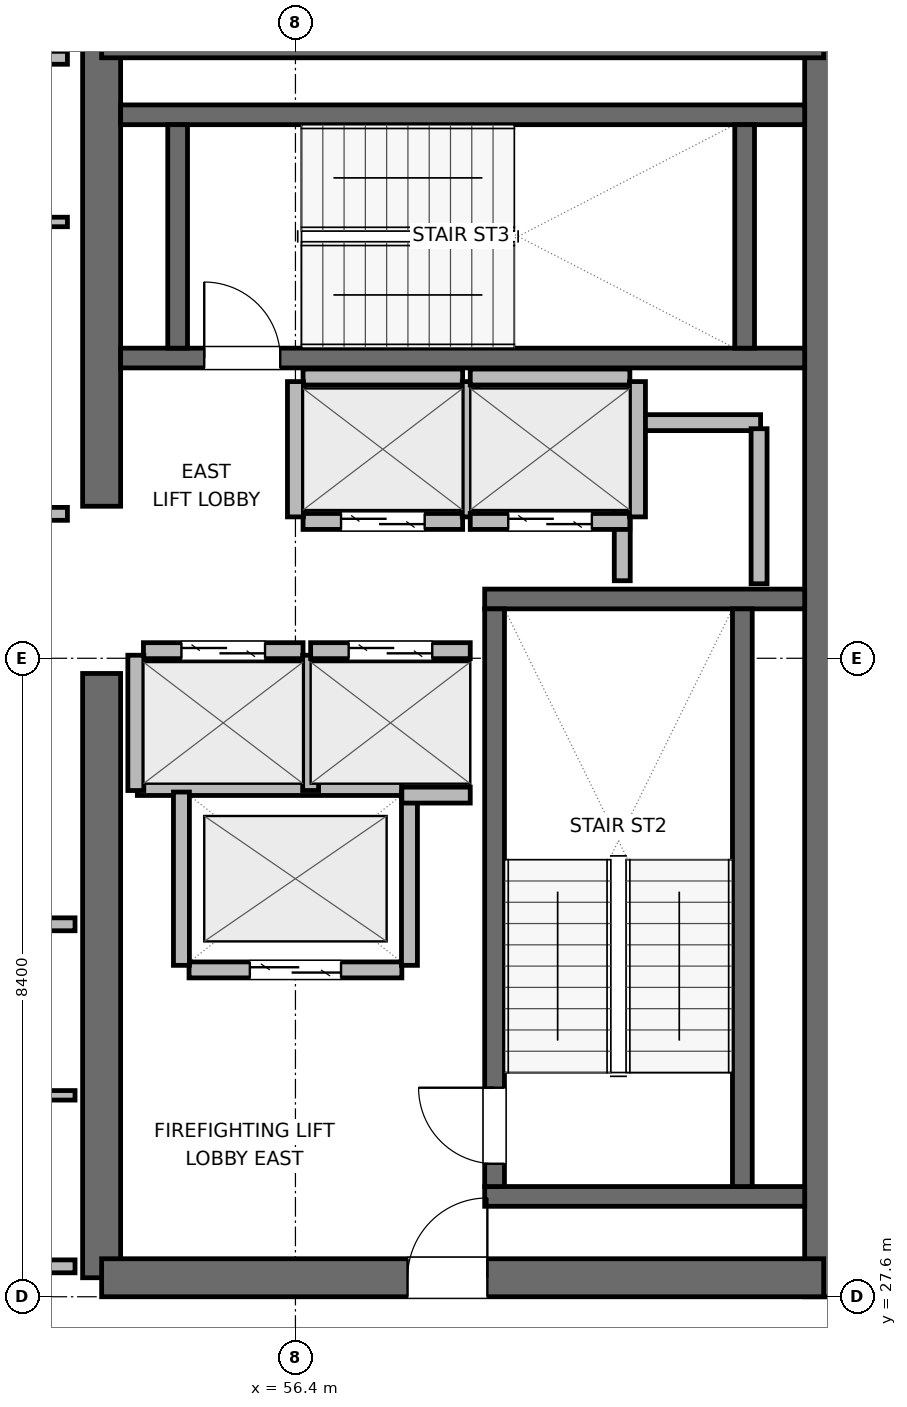
"""IFC4 building model, lengths in metres.
Left out: names, types, materials, properties, quantities, classifications, styles, units other than length and angle.
Written with IfcOpenShell. Run it as: python <this file> out.ifc"""

import sys

from ifc_helpers import new_model, si_unit, direction, frame, frame_2d, origin, place, context, subcontext, project, spatial, rectangle, extrude, element, fill, save


model = new_model("IFC4")
c1 = context("Model", 3, precision=1e-05, world=origin(), true_north=direction((0.0, 1.0)))
c2 = subcontext(c1, "Body", "Model", "MODEL_VIEW")
j1 = project(units=[si_unit("LENGTHUNIT", "METRE"), si_unit("PLANEANGLEUNIT", "RADIAN")], contexts=[c1])
p1 = place(None, origin())
s1 = spatial("IfcSite", under=j1, at=p1, CompositionType="ELEMENT")
p2 = place(p1, origin())
s2 = spatial("IfcBuilding", under=s1, at=p2, CompositionType="ELEMENT")
p3 = place(p2, frame((0.0, 0.0, 346.5)))
s3 = spatial("IfcBuildingStorey", under=s2, at=p3, CompositionType="ELEMENT", Elevation=346.5)
p4 = place(p3, frame((53.85, 27.85, 0.0), z_axis=(0.0, 0.0, 1.0), x_axis=(0.0, 1.0, 0.0)))
e1 = element("IfcWall", 1, at=p4, inside=s3, PredefinedType="SHEAR", context=c2, shape_type="SweptSolid", body=[
    extrude(rectangle(XDim=7.95, YDim=0.5, at=frame_2d((3.975, 0.0))), origin(), (0.0, 0.0, 1.0), 3.9),
])
p5 = place(p3, frame((53.85, 38.0, 0.0), z_axis=(0.0, 0.0, 1.0), x_axis=(0.0, 1.0, 0.0)))
e2 = element("IfcWall", 2, at=p5, inside=s3, PredefinedType="SHEAR", context=c2, shape_type="SweptSolid", body=[
    extrude(rectangle(XDim=6.15, YDim=0.5, at=frame_2d((3.075, 0.0))), origin(), (0.0, 0.0, 1.0), 3.9),
])
p6 = place(p3, frame((63.35, 27.6, 0.0), z_axis=(0.0, 0.0, 1.0), x_axis=(0.0, 1.0, 0.0)))
e3 = element("IfcWall", 3, at=p6, inside=s3, PredefinedType="SHEAR", context=c2, shape_type="SweptSolid", body=[
    extrude(rectangle(XDim=16.8, YDim=0.5, at=frame_2d((8.4, 0.0))), origin(), (0.0, 0.0, 1.0), 3.9),
])
p7 = place(p3, frame((53.85, 27.85, 0.0), z_axis=(0.0, 0.0, 1.0), x_axis=(1.0, 0.0, 0.0)))
e4 = element("IfcWall", 4, at=p7, inside=s3, PredefinedType="SHEAR", context=c2, shape_type="SweptSolid", body=[
    extrude(rectangle(XDim=9.5, YDim=0.5, at=frame_2d((4.75, 0.0))), origin(), (0.0, 0.0, 1.0), 3.9),
])
p8 = place(p7, frame((4.025, 0.0, 0.0)))
e5 = element("IfcOpeningElement", 5, at=p8, cuts=e4, PredefinedType="OPENING", context=c2, shape_type="SweptSolid", body=[
    extrude(rectangle(XDim=1.05, YDim=2.04, at=frame_2d((0.525, 1.02))), frame((0.0, 0.26, 0.0), z_axis=(0.0, -1.0, 0.0), x_axis=(1.0, 0.0, 0.0)), (0.0, 0.0, 1.0), 0.52),
])
p9 = place(p3, frame((53.85, 44.15, 0.0), z_axis=(0.0, 0.0, 1.0), x_axis=(1.0, 0.0, 0.0)))
e6 = element("IfcWall", 6, at=p9, inside=s3, PredefinedType="SHEAR", context=c2, shape_type="SweptSolid", body=[
    extrude(rectangle(XDim=9.5, YDim=0.5, at=frame_2d((4.75, 0.0))), origin(), (0.0, 0.0, 1.0), 3.9),
])
for number, where, z_axis, x_axis in (
    (7, (58.89, 28.92, 0.0), (0.0, 0.0, 1.0), (1.0, 0.0, 0.0)),
    (8, (58.89, 36.78, 0.0), (0.0, 0.0, 1.0), (1.0, 0.0, 0.0)),
):
    element("IfcWall", number, at=place(p3, frame(where, z_axis=z_axis, x_axis=x_axis)), inside=s3, PredefinedType="SHEAR", context=c2, shape_type="SweptSolid", body=[
        extrude(rectangle(XDim=4.21, YDim=0.26, at=frame_2d((2.105, 0.0))), origin(), (0.0, 0.0, 1.0), 3.9),
    ])
p10 = place(p3, frame((59.02, 29.05, 0.0), z_axis=(0.0, 0.0, 1.0), x_axis=(0.0, 1.0, 0.0)))
e9 = element("IfcWall", 9, at=p10, inside=s3, PredefinedType="SHEAR", context=c2, shape_type="SweptSolid", body=[
    extrude(rectangle(XDim=7.6, YDim=0.26, at=frame_2d((3.8, 0.0))), origin(), (0.0, 0.0, 1.0), 3.9),
])
p11 = place(p10, frame((0.3, 0.0, 0.0)))
e10 = element("IfcOpeningElement", 10, at=p11, cuts=e9, PredefinedType="OPENING", context=c2, shape_type="SweptSolid", body=[
    extrude(rectangle(XDim=1.0, YDim=2.04, at=frame_2d((0.5, 1.02))), frame((0.0, 0.14, 0.0), z_axis=(0.0, -1.0, 0.0), x_axis=(1.0, 0.0, 0.0)), (0.0, 0.0, 1.0), 0.28),
])
p12 = place(p3, frame((62.28, 29.05, 0.0), z_axis=(0.0, 0.0, 1.0), x_axis=(0.0, 1.0, 0.0)))
e11 = element("IfcWall", 11, at=p12, inside=s3, PredefinedType="SHEAR", context=c2, shape_type="SweptSolid", body=[
    extrude(rectangle(XDim=7.6, YDim=0.26, at=frame_2d((3.8, 0.0))), origin(), (0.0, 0.0, 1.0), 3.9),
])
p13 = place(p3, frame((54.1, 39.95, 0.0), z_axis=(0.0, 0.0, 1.0), x_axis=(1.0, 0.0, 0.0)))
e12 = element("IfcWall", 12, at=p13, inside=s3, PredefinedType="SHEAR", context=c2, shape_type="SweptSolid", body=[
    extrude(rectangle(XDim=9.0, YDim=0.26, at=frame_2d((4.5, 0.0))), origin(), (0.0, 0.0, 1.0), 3.9),
])
p14 = place(p13, frame((1.1, 0.0, 0.0)))
e13 = element("IfcOpeningElement", 13, at=p14, cuts=e12, PredefinedType="OPENING", context=c2, shape_type="SweptSolid", body=[
    extrude(rectangle(XDim=1.0, YDim=2.04, at=frame_2d((0.5, 1.02))), frame((0.0, 0.14, 0.0), z_axis=(0.0, -1.0, 0.0), x_axis=(1.0, 0.0, 0.0)), (0.0, 0.0, 1.0), 0.28),
])
p15 = place(p3, frame((54.1, 43.15, 0.0), z_axis=(0.0, 0.0, 1.0), x_axis=(1.0, 0.0, 0.0)))
e14 = element("IfcWall", 14, at=p15, inside=s3, PredefinedType="SHEAR", context=c2, shape_type="SweptSolid", body=[
    extrude(rectangle(XDim=9.0, YDim=0.26, at=frame_2d((4.5, 0.0))), origin(), (0.0, 0.0, 1.0), 3.9),
])
for number, where, z_axis, x_axis in (
    (15, (54.85, 40.08, 0.0), (0.0, 0.0, 1.0), (0.0, 1.0, 0.0)),
    (16, (62.31, 40.08, 0.0), (0.0, 0.0, 1.0), (0.0, 1.0, 0.0)),
):
    element("IfcWall", number, at=place(p3, frame(where, z_axis=z_axis, x_axis=x_axis)), inside=s3, PredefinedType="SHEAR", context=c2, shape_type="SweptSolid", body=[
        extrude(rectangle(XDim=2.94, YDim=0.26, at=frame_2d((1.47, 0.0))), origin(), (0.0, 0.0, 1.0), 3.9),
    ])
p16 = place(p3, frame((60.72, 39.1, 0.0), z_axis=(0.0, 0.0, 1.0), x_axis=(1.0, 0.0, 0.0)))
e17 = element("IfcWall", 17, at=p16, inside=s3, PredefinedType="PARTITIONING", context=c2, shape_type="SweptSolid", body=[
    extrude(rectangle(XDim=1.8, YDim=0.21, at=frame_2d((0.9, 0.0))), origin(), (0.0, 0.0, 1.0), 3.68),
])
p17 = place(p3, frame((60.7, 37.02, 0.0), z_axis=(0.0, 0.0, 1.0), x_axis=(0.0, 1.0, 0.0)))
e18 = element("IfcWall", 18, at=p17, inside=s3, PredefinedType="PARTITIONING", context=c2, shape_type="SweptSolid", body=[
    extrude(rectangle(XDim=1.96, YDim=0.21, at=frame_2d((0.98, 0.0))), origin(), (0.0, 0.0, 1.0), 3.68),
])
p18 = place(p3, frame((62.5, 36.98, 0.0), z_axis=(0.0, 0.0, 1.0), x_axis=(0.0, 1.0, 0.0)))
e19 = element("IfcWall", 19, at=p18, inside=s3, PredefinedType="PARTITIONING", context=c2, shape_type="SweptSolid", body=[
    extrude(rectangle(XDim=2.04, YDim=0.21, at=frame_2d((1.02, 0.0))), origin(), (0.0, 0.0, 1.0), 3.68),
])
p19 = place(p3, frame((55.0, 31.9, 0.0), z_axis=(0.0, 0.0, 1.0), x_axis=(1.0, 0.0, 0.0)))
e20 = element("IfcWall", 20, at=p19, inside=s3, PredefinedType="PARTITIONING", context=c2, shape_type="SweptSolid", body=[
    extrude(rectangle(XDim=2.8, YDim=0.21, at=frame_2d((1.4, 0.0))), origin(), (0.0, 0.0, 1.0), 3.68),
])
p20 = place(p19, frame((0.8, 0.0, 0.0)))
e21 = element("IfcOpeningElement", 21, at=p20, cuts=e20, PredefinedType="OPENING", context=c2, shape_type="SweptSolid", body=[
    extrude(rectangle(XDim=1.2, YDim=2.04, at=frame_2d((0.6, 1.02))), frame((0.0, 0.115, 0.0), z_axis=(0.0, -1.0, 0.0), x_axis=(1.0, 0.0, 0.0)), (0.0, 0.0, 1.0), 0.23),
])
p21 = place(p3, frame((54.32, 34.3, 0.0), z_axis=(0.0, 0.0, 1.0), x_axis=(1.0, 0.0, 0.0)))
e22 = element("IfcWall", 22, at=p21, inside=s3, PredefinedType="PARTITIONING", context=c2, shape_type="SweptSolid", body=[
    extrude(rectangle(XDim=3.48, YDim=0.21, at=frame_2d((1.74, 0.0))), origin(), (0.0, 0.0, 1.0), 3.68),
])
for number, where, z_axis, x_axis in (
    (23, (54.9, 31.96, 0.0), (0.0, 0.0, 1.0), (0.0, 1.0, 0.0)),
    (24, (57.9, 31.96, 0.0), (0.0, 0.0, 1.0), (0.0, 1.0, 0.0)),
):
    element("IfcWall", number, at=place(p3, frame(where, z_axis=z_axis, x_axis=x_axis)), inside=s3, PredefinedType="PARTITIONING", context=c2, shape_type="SweptSolid", body=[
        extrude(rectangle(XDim=2.28, YDim=0.21, at=frame_2d((1.14, 0.0))), origin(), (0.0, 0.0, 1.0), 3.68),
    ])
p22 = place(p3, frame((54.4, 36.1, 0.0), z_axis=(0.0, 0.0, 1.0), x_axis=(1.0, 0.0, 0.0)))
e25 = element("IfcWall", 25, at=p22, inside=s3, PredefinedType="PARTITIONING", context=c2, shape_type="SweptSolid", body=[
    extrude(rectangle(XDim=2.1, YDim=0.21, at=frame_2d((1.05, 0.0))), origin(), (0.0, 0.0, 1.0), 3.68),
])
p23 = place(p22, frame((0.5, 0.0, 0.0)))
e26 = element("IfcOpeningElement", 26, at=p23, cuts=e25, PredefinedType="OPENING", context=c2, shape_type="SweptSolid", body=[
    extrude(rectangle(XDim=1.1, YDim=2.04, at=frame_2d((0.55, 1.02))), frame((0.0, 0.115, 0.0), z_axis=(0.0, -1.0, 0.0), x_axis=(1.0, 0.0, 0.0)), (0.0, 0.0, 1.0), 0.23),
])
for number, where, z_axis, x_axis in (
    (27, (54.3, 34.26, 0.0), (0.0, 0.0, 1.0), (0.0, 1.0, 0.0)),
    (28, (56.6, 34.26, 0.0), (0.0, 0.0, 1.0), (0.0, 1.0, 0.0)),
):
    element("IfcWall", number, at=place(p3, frame(where, z_axis=z_axis, x_axis=x_axis)), inside=s3, PredefinedType="PARTITIONING", context=c2, shape_type="SweptSolid", body=[
        extrude(rectangle(XDim=1.78, YDim=0.21, at=frame_2d((0.89, 0.0))), origin(), (0.0, 0.0, 1.0), 3.68),
    ])
p24 = place(p3, frame((56.6, 36.1, 0.0), z_axis=(0.0, 0.0, 1.0), x_axis=(1.0, 0.0, 0.0)))
e29 = element("IfcWall", 29, at=p24, inside=s3, PredefinedType="PARTITIONING", context=c2, shape_type="SweptSolid", body=[
    extrude(rectangle(XDim=2.1, YDim=0.21, at=frame_2d((1.05, 0.0))), origin(), (0.0, 0.0, 1.0), 3.68),
])
p25 = place(p24, frame((0.5, 0.0, 0.0)))
e30 = element("IfcOpeningElement", 30, at=p25, cuts=e29, PredefinedType="OPENING", context=c2, shape_type="SweptSolid", body=[
    extrude(rectangle(XDim=1.1, YDim=2.04, at=frame_2d((0.55, 1.02))), frame((0.0, 0.115, 0.0), z_axis=(0.0, -1.0, 0.0), x_axis=(1.0, 0.0, 0.0)), (0.0, 0.0, 1.0), 0.23),
])
p26 = place(p3, frame((57.8, 34.2, 0.0), z_axis=(0.0, 0.0, 1.0), x_axis=(1.0, 0.0, 0.0)))
e31 = element("IfcWall", 31, at=p26, inside=s3, PredefinedType="PARTITIONING", context=c2, shape_type="SweptSolid", body=[
    extrude(rectangle(XDim=0.9, YDim=0.21, at=frame_2d((0.45, 0.0))), origin(), (0.0, 0.0, 1.0), 3.68),
])
p27 = place(p3, frame((56.5, 37.8, 0.0), z_axis=(0.0, 0.0, 1.0), x_axis=(1.0, 0.0, 0.0)))
e32 = element("IfcWall", 32, at=p27, inside=s3, PredefinedType="PARTITIONING", context=c2, shape_type="SweptSolid", body=[
    extrude(rectangle(XDim=2.1, YDim=0.21, at=frame_2d((1.05, 0.0))), origin(), (0.0, 0.0, 1.0), 3.68),
])
p28 = place(p27, frame((0.5, 0.0, 0.0)))
e33 = element("IfcOpeningElement", 33, at=p28, cuts=e32, PredefinedType="OPENING", context=c2, shape_type="SweptSolid", body=[
    extrude(rectangle(XDim=1.1, YDim=2.04, at=frame_2d((0.55, 1.02))), frame((0.0, 0.115, 0.0), z_axis=(0.0, -1.0, 0.0), x_axis=(1.0, 0.0, 0.0)), (0.0, 0.0, 1.0), 0.23),
])
p29 = place(p3, frame((56.5, 39.7, 0.0), z_axis=(0.0, 0.0, 1.0), x_axis=(1.0, 0.0, 0.0)))
e34 = element("IfcWall", 34, at=p29, inside=s3, PredefinedType="PARTITIONING", context=c2, shape_type="SweptSolid", body=[
    extrude(rectangle(XDim=2.1, YDim=0.21, at=frame_2d((1.05, 0.0))), origin(), (0.0, 0.0, 1.0), 3.68),
])
for number, where, z_axis, x_axis in (
    (35, (56.4, 37.86, 0.0), (0.0, 0.0, 1.0), (0.0, 1.0, 0.0)),
    (36, (58.7, 37.86, 0.0), (0.0, 0.0, 1.0), (0.0, 1.0, 0.0)),
):
    element("IfcWall", number, at=place(p3, frame(where, z_axis=z_axis, x_axis=x_axis)), inside=s3, PredefinedType="PARTITIONING", context=c2, shape_type="SweptSolid", body=[
        extrude(rectangle(XDim=1.78, YDim=0.21, at=frame_2d((0.89, 0.0))), origin(), (0.0, 0.0, 1.0), 3.68),
    ])
p30 = place(p3, frame((58.7, 37.8, 0.0), z_axis=(0.0, 0.0, 1.0), x_axis=(1.0, 0.0, 0.0)))
e37 = element("IfcWall", 37, at=p30, inside=s3, PredefinedType="PARTITIONING", context=c2, shape_type="SweptSolid", body=[
    extrude(rectangle(XDim=2.1, YDim=0.21, at=frame_2d((1.05, 0.0))), origin(), (0.0, 0.0, 1.0), 3.68),
])
p31 = place(p30, frame((0.5, 0.0, 0.0)))
e38 = element("IfcOpeningElement", 38, at=p31, cuts=e37, PredefinedType="OPENING", context=c2, shape_type="SweptSolid", body=[
    extrude(rectangle(XDim=1.1, YDim=2.04, at=frame_2d((0.55, 1.02))), frame((0.0, 0.115, 0.0), z_axis=(0.0, -1.0, 0.0), x_axis=(1.0, 0.0, 0.0)), (0.0, 0.0, 1.0), 0.23),
])
p32 = place(p3, frame((58.7, 39.7, 0.0), z_axis=(0.0, 0.0, 1.0), x_axis=(1.0, 0.0, 0.0)))
e39 = element("IfcWall", 39, at=p32, inside=s3, PredefinedType="PARTITIONING", context=c2, shape_type="SweptSolid", body=[
    extrude(rectangle(XDim=2.1, YDim=0.21, at=frame_2d((1.05, 0.0))), origin(), (0.0, 0.0, 1.0), 3.68),
])
p33 = place(p3, frame((60.9, 37.86, 0.0), z_axis=(0.0, 0.0, 1.0), x_axis=(0.0, 1.0, 0.0)))
e40 = element("IfcWall", 40, at=p33, inside=s3, PredefinedType="PARTITIONING", context=c2, shape_type="SweptSolid", body=[
    extrude(rectangle(XDim=1.78, YDim=0.21, at=frame_2d((0.89, 0.0))), origin(), (0.0, 0.0, 1.0), 3.68),
])
p34 = place(p3, frame((49.287, 28.0, 0.0), z_axis=(0.0, 0.0, 1.0), x_axis=(1.0, 0.0, 0.0)))
e41 = element("IfcWall", 41, at=p34, inside=s3, PredefinedType="PARTITIONING", context=c2, shape_type="SweptSolid", body=[
    extrude(rectangle(XDim=4.213, YDim=0.17, at=frame_2d((2.106, 0.0))), origin(), (0.0, 0.0, 1.0), 2.765),
])
p35 = place(p3, frame((52.2, 32.5, 0.0), z_axis=(0.0, 0.0, 1.0), x_axis=(1.0, 0.0, 0.0)))
e42 = element("IfcWall", 42, at=p35, inside=s3, PredefinedType="PARTITIONING", context=c2, shape_type="SweptSolid", body=[
    extrude(rectangle(XDim=1.3, YDim=0.17, at=frame_2d((0.65, 0.0))), origin(), (0.0, 0.0, 1.0), 3.68),
])
p36 = place(p3, frame((49.287, 30.25, 0.0), z_axis=(0.0, 0.0, 1.0), x_axis=(1.0, 0.0, 0.0)))
e43 = element("IfcWall", 43, at=p36, inside=s3, PredefinedType="PARTITIONING", context=c2, shape_type="SweptSolid", body=[
    extrude(rectangle(XDim=4.213, YDim=0.125, at=frame_2d((2.106, 0.0))), origin(), (0.0, 0.0, 1.0), 3.68),
])
p37 = place(p3, frame((49.287, 37.9, 0.0), z_axis=(0.0, 0.0, 1.0), x_axis=(1.0, 0.0, 0.0)))
e44 = element("IfcWall", 44, at=p37, inside=s3, PredefinedType="PARTITIONING", context=c2, shape_type="SweptSolid", body=[
    extrude(rectangle(XDim=4.113, YDim=0.17, at=frame_2d((2.056, 0.0))), origin(), (0.0, 0.0, 1.0), 3.68),
])
p38 = place(p3, frame((49.287, 43.9, 0.0), z_axis=(0.0, 0.0, 1.0), x_axis=(1.0, 0.0, 0.0)))
e45 = element("IfcWall", 45, at=p38, inside=s3, PredefinedType="PARTITIONING", context=c2, shape_type="SweptSolid", body=[
    extrude(rectangle(XDim=4.113, YDim=0.17, at=frame_2d((2.056, 0.0))), origin(), (0.0, 0.0, 1.0), 2.765),
])
p39 = place(p3, frame((49.287, 41.74, 0.0), z_axis=(0.0, 0.0, 1.0), x_axis=(1.0, 0.0, 0.0)))
e46 = element("IfcWall", 46, at=p39, inside=s3, PredefinedType="PARTITIONING", context=c2, shape_type="SweptSolid", body=[
    extrude(rectangle(XDim=4.113, YDim=0.125, at=frame_2d((2.056, 0.0))), origin(), (0.0, 0.0, 1.0), 3.68),
])
p40 = place(p11, origin())
e47 = element("IfcDoor", 47, at=p40, inside=s3, OperationType="SINGLE_SWING_RIGHT", PredefinedType="DOOR", context=c2, shape_type="SweptSolid", body=[
    extrude(rectangle(XDim=1.0, YDim=2.04, at=frame_2d((0.5, 1.02))), frame((0.0, 0.025, 0.0), z_axis=(0.0, -1.0, 0.0), x_axis=(1.0, 0.0, 0.0)), (0.0, 0.0, 1.0), 0.05),
])
fill(e10, e47)
p41 = place(p14, origin())
e48 = element("IfcDoor", 48, at=p41, inside=s3, OperationType="SINGLE_SWING_LEFT", PredefinedType="DOOR", context=c2, shape_type="SweptSolid", body=[
    extrude(rectangle(XDim=1.0, YDim=2.04, at=frame_2d((0.5, 1.02))), frame((0.0, 0.025, 0.0), z_axis=(0.0, -1.0, 0.0), x_axis=(1.0, 0.0, 0.0)), (0.0, 0.0, 1.0), 0.05),
])
fill(e13, e48)
p42 = place(p20, origin())
e49 = element("IfcDoor", 49, at=p42, inside=s3, OperationType="DOUBLE_DOOR_SLIDING", PredefinedType="DOOR", context=c2, shape_type="SweptSolid", body=[
    extrude(rectangle(XDim=1.2, YDim=2.04, at=frame_2d((0.6, 1.02))), frame((0.0, 0.025, 0.0), z_axis=(0.0, -1.0, 0.0), x_axis=(1.0, 0.0, 0.0)), (0.0, 0.0, 1.0), 0.05),
])
fill(e21, e49)
p43 = place(p23, origin())
e50 = element("IfcDoor", 50, at=p43, inside=s3, OperationType="DOUBLE_DOOR_SLIDING", PredefinedType="DOOR", context=c2, shape_type="SweptSolid", body=[
    extrude(rectangle(XDim=1.1, YDim=2.04, at=frame_2d((0.55, 1.02))), frame((0.0, 0.025, 0.0), z_axis=(0.0, -1.0, 0.0), x_axis=(1.0, 0.0, 0.0)), (0.0, 0.0, 1.0), 0.05),
])
fill(e26, e50)
p44 = place(p25, origin())
e51 = element("IfcDoor", 51, at=p44, inside=s3, OperationType="DOUBLE_DOOR_SLIDING", PredefinedType="DOOR", context=c2, shape_type="SweptSolid", body=[
    extrude(rectangle(XDim=1.1, YDim=2.04, at=frame_2d((0.55, 1.02))), frame((0.0, 0.025, 0.0), z_axis=(0.0, -1.0, 0.0), x_axis=(1.0, 0.0, 0.0)), (0.0, 0.0, 1.0), 0.05),
])
fill(e30, e51)
p45 = place(p28, origin())
e52 = element("IfcDoor", 52, at=p45, inside=s3, OperationType="DOUBLE_DOOR_SLIDING", PredefinedType="DOOR", context=c2, shape_type="SweptSolid", body=[
    extrude(rectangle(XDim=1.1, YDim=2.04, at=frame_2d((0.55, 1.02))), frame((0.0, 0.025, 0.0), z_axis=(0.0, -1.0, 0.0), x_axis=(1.0, 0.0, 0.0)), (0.0, 0.0, 1.0), 0.05),
])
fill(e33, e52)
p46 = place(p31, origin())
e53 = element("IfcDoor", 53, at=p46, inside=s3, OperationType="DOUBLE_DOOR_SLIDING", PredefinedType="DOOR", context=c2, shape_type="SweptSolid", body=[
    extrude(rectangle(XDim=1.1, YDim=2.04, at=frame_2d((0.55, 1.02))), frame((0.0, 0.025, 0.0), z_axis=(0.0, -1.0, 0.0), x_axis=(1.0, 0.0, 0.0)), (0.0, 0.0, 1.0), 0.05),
])
fill(e38, e53)
p47 = place(p8, origin())
e54 = element("IfcDoor", 54, at=p47, inside=s3, OperationType="SINGLE_SWING_RIGHT", PredefinedType="DOOR", context=c2, shape_type="SweptSolid", body=[
    extrude(rectangle(XDim=1.05, YDim=2.04, at=frame_2d((0.525, 1.02))), frame((0.0, 0.025, 0.0), z_axis=(0.0, -1.0, 0.0), x_axis=(1.0, 0.0, 0.0)), (0.0, 0.0, 1.0), 0.05),
])
fill(e5, e54)
save(model, sys.argv[1])
